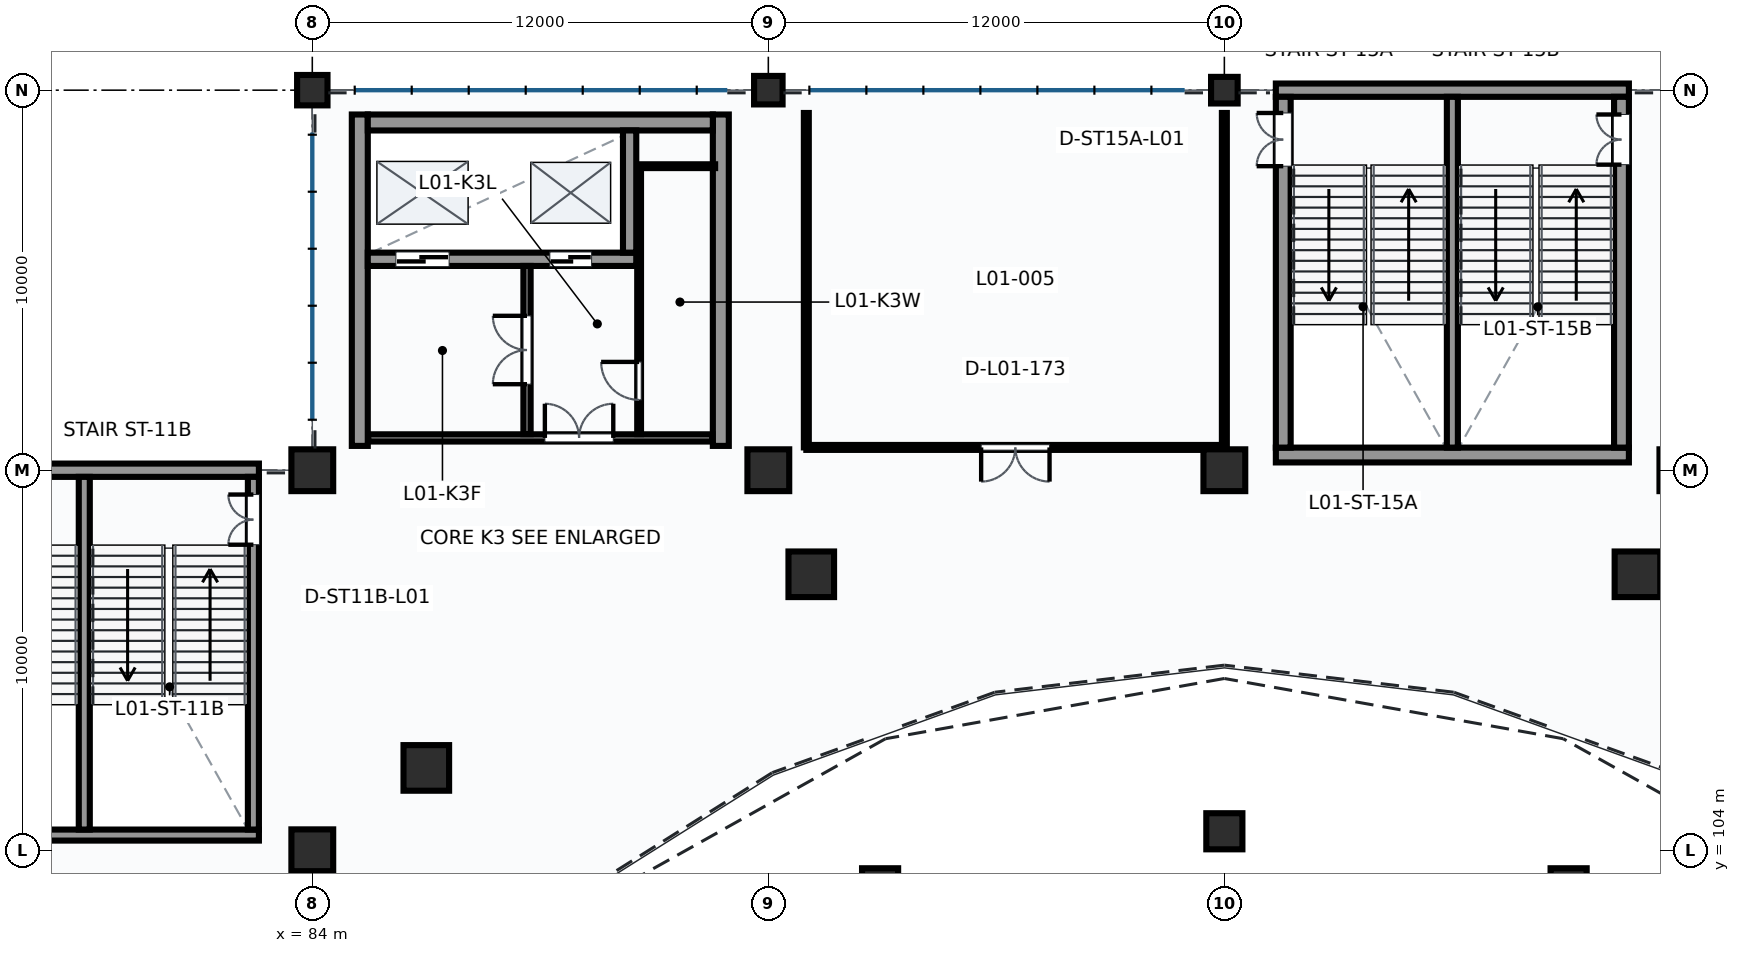
"""IFC4 building model, lengths in metres.
Left out: names, types, materials, properties, quantities, classifications, styles, units other than length and angle.
Written with IfcOpenShell. Run it as: python <this file> out.ifc"""

import sys

from ifc_helpers import new_model, si_unit, direction, frame, frame_2d, origin, origin_2d, place, context, subcontext, project, spatial, rectangle, extrude, element, fill, save


model = new_model("IFC4")
c1 = context("Model", 3, precision=1e-05, world=origin(), true_north=direction((0.0, 1.0)))
c2 = subcontext(c1, "Body", "Model", "MODEL_VIEW")
j1 = project(units=[si_unit("LENGTHUNIT", "METRE"), si_unit("PLANEANGLEUNIT", "RADIAN")], contexts=[c1])
p1 = place(None, origin())
s1 = spatial("IfcSite", under=j1, at=p1, CompositionType="ELEMENT")
p2 = place(p1, origin())
s2 = spatial("IfcBuilding", under=s1, at=p2, CompositionType="ELEMENT")
p3 = place(p2, frame((0.0, 0.0, 5.4)))
s3 = spatial("IfcBuildingStorey", under=s2, at=p3, CompositionType="ELEMENT", Elevation=5.4)
for number, where, z_axis, x_axis in (
    (1, (84.0, 104.0, 0.0), (0.0, 0.0, 1.0), (1.0, 0.0, 0.0)),
    (2, (84.0, 114.0, 0.0), (0.0, 0.0, 1.0), (1.0, 0.0, 0.0)),
):
    element("IfcColumn", number, at=place(p3, frame(where, z_axis=z_axis, x_axis=x_axis)), inside=s3, PredefinedType="COLUMN", context=c2, shape_type="SweptSolid", body=[
        extrude(rectangle(XDim=1.1, YDim=1.1, at=origin_2d()), origin(), (0.0, 0.0, 1.0), 4.8),
    ])
p4 = place(p3, frame((84.0, 124.0, 0.0), z_axis=(0.0, 0.0, 1.0), x_axis=(1.0, 0.0, 0.0)))
e3 = element("IfcColumn", 3, at=p4, inside=s3, PredefinedType="COLUMN", context=c2, shape_type="SweptSolid", body=[
    extrude(rectangle(XDim=0.8, YDim=0.8, at=origin_2d()), origin(), (0.0, 0.0, 1.0), 4.8),
])
p5 = place(p3, frame((96.0, 114.0, 0.0), z_axis=(0.0, 0.0, 1.0), x_axis=(1.0, 0.0, 0.0)))
e4 = element("IfcColumn", 4, at=p5, inside=s3, PredefinedType="COLUMN", context=c2, shape_type="SweptSolid", body=[
    extrude(rectangle(XDim=1.1, YDim=1.1, at=origin_2d()), origin(), (0.0, 0.0, 1.0), 4.8),
])
p6 = place(p3, frame((96.0, 124.0, 0.0), z_axis=(0.0, 0.0, 1.0), x_axis=(1.0, 0.0, 0.0)))
e5 = element("IfcColumn", 5, at=p6, inside=s3, PredefinedType="COLUMN", context=c2, shape_type="SweptSolid", body=[
    extrude(rectangle(XDim=0.75, YDim=0.75, at=origin_2d()), origin(), (0.0, 0.0, 1.0), 4.8),
])
p7 = place(p3, frame((108.0, 114.0, 0.0), z_axis=(0.0, 0.0, 1.0), x_axis=(1.0, 0.0, 0.0)))
e6 = element("IfcColumn", 6, at=p7, inside=s3, PredefinedType="COLUMN", context=c2, shape_type="SweptSolid", body=[
    extrude(rectangle(XDim=1.1, YDim=1.1, at=origin_2d()), origin(), (0.0, 0.0, 1.0), 4.8),
])
p8 = place(p3, frame((108.0, 124.0, 0.0), z_axis=(0.0, 0.0, 1.0), x_axis=(1.0, 0.0, 0.0)))
e7 = element("IfcColumn", 7, at=p8, inside=s3, PredefinedType="COLUMN", context=c2, shape_type="SweptSolid", body=[
    extrude(rectangle(XDim=0.7, YDim=0.7, at=origin_2d()), origin(), (0.0, 0.0, 1.0), 4.8),
])
p9 = place(p3, frame((117.059, 103.052, 0.0), z_axis=(0.0, 0.0, 1.0), x_axis=(1.0, 0.0, 0.0)))
e8 = element("IfcColumn", 8, at=p9, inside=s3, PredefinedType="COLUMN", context=c2, shape_type="SweptSolid", body=[
    extrude(rectangle(XDim=0.95, YDim=0.95, at=origin_2d()), origin(), (0.0, 0.0, 1.0), 4.8),
])
p10 = place(p3, frame((118.87, 111.262, 0.0), z_axis=(0.0, 0.0, 1.0), x_axis=(1.0, 0.0, 0.0)))
e9 = element("IfcColumn", 9, at=p10, inside=s3, PredefinedType="COLUMN", context=c2, shape_type="SweptSolid", body=[
    extrude(rectangle(XDim=1.2, YDim=1.2, at=origin_2d()), origin(), (0.0, 0.0, 1.0), 4.8),
])
for number, where, z_axis, x_axis in (
    (10, (108.0, 104.5, 0.0), (0.0, 0.0, 1.0), (1.0, 0.0, 0.0)),
    (11, (98.941, 103.052, 0.0), (0.0, 0.0, 1.0), (1.0, 0.0, 0.0)),
):
    element("IfcColumn", number, at=place(p3, frame(where, z_axis=z_axis, x_axis=x_axis)), inside=s3, PredefinedType="COLUMN", context=c2, shape_type="SweptSolid", body=[
        extrude(rectangle(XDim=0.95, YDim=0.95, at=origin_2d()), origin(), (0.0, 0.0, 1.0), 4.8),
    ])
for number, where, z_axis, x_axis in (
    (12, (97.13, 111.262, 0.0), (0.0, 0.0, 1.0), (1.0, 0.0, 0.0)),
    (13, (87.0, 106.167, 0.0), (0.0, 0.0, 1.0), (1.0, 0.0, 0.0)),
):
    element("IfcColumn", number, at=place(p3, frame(where, z_axis=z_axis, x_axis=x_axis)), inside=s3, PredefinedType="COLUMN", context=c2, shape_type="SweptSolid", body=[
        extrude(rectangle(XDim=1.2, YDim=1.2, at=origin_2d()), origin(), (0.0, 0.0, 1.0), 4.8),
    ])
p11 = place(p3, frame((73.405, 104.4, 0.0), z_axis=(0.0, 0.0, 1.0), x_axis=(1.0, 0.0, 0.0)))
e14 = element("IfcWall", 14, at=p11, inside=s3, PredefinedType="SHEAR", context=c2, shape_type="SweptSolid", body=[
    extrude(rectangle(XDim=9.19, YDim=0.29, at=frame_2d((4.595, 0.0))), origin(), (0.0, 0.0, 1.0), 4.8),
])
p12 = place(p3, frame((73.405, 114.0, 0.0), z_axis=(0.0, 0.0, 1.0), x_axis=(1.0, 0.0, 0.0)))
e15 = element("IfcWall", 15, at=p12, inside=s3, PredefinedType="SHEAR", context=c2, shape_type="SweptSolid", body=[
    extrude(rectangle(XDim=9.19, YDim=0.35, at=frame_2d((4.595, 0.0))), origin(), (0.0, 0.0, 1.0), 3.984),
])
p13 = place(p3, frame((82.45, 104.545, 0.0), z_axis=(0.0, 0.0, 1.0), x_axis=(0.0, 1.0, 0.0)))
e16 = element("IfcWall", 16, at=p13, inside=s3, PredefinedType="SHEAR", context=c2, shape_type="SweptSolid", body=[
    extrude(rectangle(XDim=9.28, YDim=0.29, at=frame_2d((4.64, 0.0))), origin(), (0.0, 0.0, 1.0), 4.8),
])
p14 = place(p13, frame((7.495, 0.0, 0.0)))
e17 = element("IfcOpeningElement", 17, at=p14, cuts=e16, PredefinedType="OPENING", context=c2, shape_type="SweptSolid", body=[
    extrude(rectangle(XDim=1.32, YDim=2.2, at=frame_2d((0.66, 1.1))), frame((0.0, 0.155, 0.0), z_axis=(0.0, -1.0, 0.0), x_axis=(1.0, 0.0, 0.0)), (0.0, 0.0, 1.0), 0.31),
])
p15 = place(p3, frame((78.0, 104.545, 0.0), z_axis=(0.0, 0.0, 1.0), x_axis=(0.0, 1.0, 0.0)))
e18 = element("IfcWall", 18, at=p15, inside=s3, PredefinedType="SHEAR", context=c2, shape_type="SweptSolid", body=[
    extrude(rectangle(XDim=9.28, YDim=0.29, at=frame_2d((4.64, 0.0))), origin(), (0.0, 0.0, 1.0), 4.8),
])
p16 = place(p3, frame((109.355, 114.4, 0.0), z_axis=(0.0, 0.0, 1.0), x_axis=(1.0, 0.0, 0.0)))
e19 = element("IfcWall", 19, at=p16, inside=s3, PredefinedType="SHEAR", context=c2, shape_type="SweptSolid", body=[
    extrude(rectangle(XDim=9.29, YDim=0.39, at=frame_2d((4.645, 0.0))), origin(), (0.0, 0.0, 1.0), 4.8),
])
p17 = place(p3, frame((109.355, 124.0, 0.0), z_axis=(0.0, 0.0, 1.0), x_axis=(1.0, 0.0, 0.0)))
e20 = element("IfcWall", 20, at=p17, inside=s3, PredefinedType="SHEAR", context=c2, shape_type="SweptSolid", body=[
    extrude(rectangle(XDim=9.29, YDim=0.35, at=frame_2d((4.645, 0.0))), origin(), (0.0, 0.0, 1.0), 3.757),
])
p18 = place(p3, frame((109.55, 114.595, 0.0), z_axis=(0.0, 0.0, 1.0), x_axis=(0.0, 1.0, 0.0)))
e21 = element("IfcWall", 21, at=p18, inside=s3, PredefinedType="SHEAR", context=c2, shape_type="SweptSolid", body=[
    extrude(rectangle(XDim=9.23, YDim=0.39, at=frame_2d((4.615, 0.0))), origin(), (0.0, 0.0, 1.0), 4.8),
])
p19 = place(p18, frame((7.405, 0.0, 0.0)))
e22 = element("IfcOpeningElement", 22, at=p19, cuts=e21, PredefinedType="OPENING", context=c2, shape_type="SweptSolid", body=[
    extrude(rectangle(XDim=1.4, YDim=2.2, at=frame_2d((0.7, 1.1))), frame((0.0, 0.205, 0.0), z_axis=(0.0, -1.0, 0.0), x_axis=(1.0, 0.0, 0.0)), (0.0, 0.0, 1.0), 0.41),
])
p20 = place(p3, frame((118.45, 114.595, 0.0), z_axis=(0.0, 0.0, 1.0), x_axis=(0.0, 1.0, 0.0)))
e23 = element("IfcWall", 23, at=p20, inside=s3, PredefinedType="SHEAR", context=c2, shape_type="SweptSolid", body=[
    extrude(rectangle(XDim=9.23, YDim=0.39, at=frame_2d((4.615, 0.0))), origin(), (0.0, 0.0, 1.0), 4.8),
])
p21 = place(p20, frame((7.445, 0.0, 0.0)))
e24 = element("IfcOpeningElement", 24, at=p21, cuts=e23, PredefinedType="OPENING", context=c2, shape_type="SweptSolid", body=[
    extrude(rectangle(XDim=1.32, YDim=2.2, at=frame_2d((0.66, 1.1))), frame((0.0, 0.205, 0.0), z_axis=(0.0, -1.0, 0.0), x_axis=(1.0, 0.0, 0.0)), (0.0, 0.0, 1.0), 0.41),
])
p22 = place(p3, frame((114.0, 114.595, 0.0), z_axis=(0.0, 0.0, 1.0), x_axis=(0.0, 1.0, 0.0)))
e25 = element("IfcWall", 25, at=p22, inside=s3, PredefinedType="SHEAR", context=c2, shape_type="SweptSolid", body=[
    extrude(rectangle(XDim=9.23, YDim=0.29, at=frame_2d((4.615, 0.0))), origin(), (0.0, 0.0, 1.0), 4.8),
])
for number, where, z_axis, x_axis in (
    (26, (85.25, 114.64, 0.0), (0.0, 0.0, 1.0), (0.0, 1.0, 0.0)),
    (27, (94.75, 114.64, 0.0), (0.0, 0.0, 1.0), (0.0, 1.0, 0.0)),
):
    element("IfcWall", number, at=place(p3, frame(where, z_axis=z_axis, x_axis=x_axis)), inside=s3, PredefinedType="SHEAR", context=c2, shape_type="SweptSolid", body=[
        extrude(rectangle(XDim=8.72, YDim=0.42, at=frame_2d((4.36, 0.0))), origin(), (0.0, 0.0, 1.0), 4.8),
    ])
p23 = place(p3, frame((85.46, 123.15, 0.0), z_axis=(0.0, 0.0, 1.0), x_axis=(1.0, 0.0, 0.0)))
e28 = element("IfcWall", 28, at=p23, inside=s3, PredefinedType="SHEAR", context=c2, shape_type="SweptSolid", body=[
    extrude(rectangle(XDim=9.08, YDim=0.42, at=frame_2d((4.54, 0.0))), origin(), (0.0, 0.0, 1.0), 4.8),
])
p24 = place(p3, frame((85.46, 119.55, 0.0), z_axis=(0.0, 0.0, 1.0), x_axis=(1.0, 0.0, 0.0)))
e29 = element("IfcWall", 29, at=p24, inside=s3, PredefinedType="SHEAR", context=c2, shape_type="SweptSolid", body=[
    extrude(rectangle(XDim=7.065, YDim=0.35, at=frame_2d((3.532, 0.0))), origin(), (0.0, 0.0, 1.0), 4.8),
])
p25 = place(p24, frame((0.74, 0.0, 0.0)))
e30 = element("IfcOpeningElement", 30, at=p25, cuts=e29, PredefinedType="OPENING", context=c2, shape_type="SweptSolid", body=[
    extrude(rectangle(XDim=1.4, YDim=2.3, at=frame_2d((0.7, 1.15))), frame((0.0, 0.185, 0.0), z_axis=(0.0, -1.0, 0.0), x_axis=(1.0, 0.0, 0.0)), (0.0, 0.0, 1.0), 0.37),
])
p26 = place(p24, frame((4.79, 0.0, 0.0)))
e31 = element("IfcOpeningElement", 31, at=p26, cuts=e29, PredefinedType="OPENING", context=c2, shape_type="SweptSolid", body=[
    extrude(rectangle(XDim=1.1, YDim=2.2, at=frame_2d((0.55, 1.1))), frame((0.0, 0.185, 0.0), z_axis=(0.0, -1.0, 0.0), x_axis=(1.0, 0.0, 0.0)), (0.0, 0.0, 1.0), 0.37),
])
p27 = place(p3, frame((92.35, 119.725, 0.0), z_axis=(0.0, 0.0, 1.0), x_axis=(0.0, 1.0, 0.0)))
e32 = element("IfcWall", 32, at=p27, inside=s3, PredefinedType="SHEAR", context=c2, shape_type="SweptSolid", body=[
    extrude(rectangle(XDim=3.215, YDim=0.35, at=frame_2d((1.607, 0.0))), origin(), (0.0, 0.0, 1.0), 4.8),
])
p28 = place(p3, frame((85.47, 114.85, 0.0), z_axis=(0.0, 0.0, 1.0), x_axis=(1.0, 0.0, 0.0)))
e33 = element("IfcWall", 33, at=p28, inside=s3, PredefinedType="PARTITIONING", context=c2, shape_type="SweptSolid", body=[
    extrude(rectangle(XDim=9.06, YDim=0.19, at=frame_2d((4.53, 0.0))), origin(), (0.0, 0.0, 1.0), 4.47),
])
p29 = place(p28, frame((4.65, 0.0, 0.0)))
e34 = element("IfcOpeningElement", 34, at=p29, cuts=e33, PredefinedType="OPENING", context=c2, shape_type="SweptSolid", body=[
    extrude(rectangle(XDim=1.8, YDim=2.3, at=frame_2d((0.9, 1.15))), frame((0.0, 0.105, 0.0), z_axis=(0.0, -1.0, 0.0), x_axis=(1.0, 0.0, 0.0)), (0.0, 0.0, 1.0), 0.21),
])
p30 = place(p3, frame((89.65, 114.95, 0.0), z_axis=(0.0, 0.0, 1.0), x_axis=(0.0, 1.0, 0.0)))
e35 = element("IfcWall", 35, at=p30, inside=s3, PredefinedType="PARTITIONING", context=c2, shape_type="SweptSolid", body=[
    extrude(rectangle(XDim=4.425, YDim=0.19, at=frame_2d((2.212, 0.0))), origin(), (0.0, 0.0, 1.0), 4.47),
])
p31 = place(p30, frame((1.313, 0.0, 0.0)))
e36 = element("IfcOpeningElement", 36, at=p31, cuts=e35, PredefinedType="OPENING", context=c2, shape_type="SweptSolid", body=[
    extrude(rectangle(XDim=1.8, YDim=2.2, at=frame_2d((0.9, 1.1))), frame((0.0, 0.105, 0.0), z_axis=(0.0, -1.0, 0.0), x_axis=(1.0, 0.0, 0.0)), (0.0, 0.0, 1.0), 0.21),
])
p32 = place(p3, frame((92.6, 114.95, 0.0), z_axis=(0.0, 0.0, 1.0), x_axis=(0.0, 1.0, 0.0)))
e37 = element("IfcWall", 37, at=p32, inside=s3, PredefinedType="PARTITIONING", context=c2, shape_type="SweptSolid", body=[
    extrude(rectangle(XDim=7.05, YDim=0.1, at=frame_2d((3.525, 0.0))), origin(), (0.0, 0.0, 1.0), 4.47),
])
p33 = place(p32, frame((0.9, 0.0, 0.0)))
e38 = element("IfcOpeningElement", 38, at=p33, cuts=e37, PredefinedType="OPENING", context=c2, shape_type="SweptSolid", body=[
    extrude(rectangle(XDim=1.0, YDim=2.1, at=frame_2d((0.5, 1.05))), frame((0.0, 0.06, 0.0), z_axis=(0.0, -1.0, 0.0), x_axis=(1.0, 0.0, 0.0)), (0.0, 0.0, 1.0), 0.12),
])
p34 = place(p3, frame((92.6, 122.0, 0.0), z_axis=(0.0, 0.0, 1.0), x_axis=(1.0, 0.0, 0.0)))
e39 = element("IfcWall", 39, at=p34, inside=s3, PredefinedType="PARTITIONING", context=c2, shape_type="SweptSolid", body=[
    extrude(rectangle(XDim=2.0, YDim=0.1, at=frame_2d((1.0, 0.0))), origin(), (0.0, 0.0, 1.0), 4.47),
])
p35 = place(p3, frame((108.0, 123.4, 0.0), z_axis=(0.0, 0.0, 1.0), x_axis=(0.0, -1.0, 0.0)))
e40 = element("IfcWall", 40, at=p35, inside=s3, PredefinedType="PARTITIONING", context=c2, shape_type="SweptSolid", body=[
    extrude(rectangle(XDim=8.8, YDim=0.13, at=frame_2d((4.4, 0.0))), origin(), (0.0, 0.0, 1.0), 3.599),
])
p36 = place(p3, frame((108.0, 114.6, 0.0), z_axis=(0.0, 0.0, 1.0), x_axis=(-1.0, 0.0, 0.0)))
e41 = element("IfcWall", 41, at=p36, inside=s3, PredefinedType="PARTITIONING", context=c2, shape_type="SweptSolid", body=[
    extrude(rectangle(XDim=11.0, YDim=0.13, at=frame_2d((5.5, 0.0))), origin(), (0.0, 0.0, 1.0), 3.599),
])
p37 = place(p36, frame((4.6, 0.0, 0.0)))
e42 = element("IfcOpeningElement", 42, at=p37, cuts=e41, PredefinedType="OPENING", context=c2, shape_type="SweptSolid", body=[
    extrude(rectangle(XDim=1.8, YDim=2.3, at=frame_2d((0.9, 1.15))), frame((0.0, 0.075, 0.0), z_axis=(0.0, -1.0, 0.0), x_axis=(1.0, 0.0, 0.0)), (0.0, 0.0, 1.0), 0.15),
])
p38 = place(p3, frame((97.0, 114.6, 0.0), z_axis=(0.0, 0.0, 1.0), x_axis=(0.0, 1.0, 0.0)))
e43 = element("IfcWall", 43, at=p38, inside=s3, PredefinedType="PARTITIONING", context=c2, shape_type="SweptSolid", body=[
    extrude(rectangle(XDim=8.8, YDim=0.13, at=frame_2d((4.4, 0.0))), origin(), (0.0, 0.0, 1.0), 4.147),
])
p39 = place(p14, origin())
e44 = element("IfcDoor", 44, at=p39, inside=s3, OperationType="DOUBLE_DOOR_SINGLE_SWING", PredefinedType="DOOR", context=c2, shape_type="SweptSolid", body=[
    extrude(rectangle(XDim=1.32, YDim=2.2, at=frame_2d((0.66, 1.1))), frame((0.0, 0.025, 0.0), z_axis=(0.0, -1.0, 0.0), x_axis=(1.0, 0.0, 0.0)), (0.0, 0.0, 1.0), 0.05),
])
fill(e17, e44)
p40 = place(p19, frame((1.4, 0.0, 0.0), z_axis=(0.0, 0.0, 1.0), x_axis=(-1.0, 0.0, 0.0)))
e45 = element("IfcDoor", 45, at=p40, inside=s3, OperationType="DOUBLE_DOOR_SINGLE_SWING", PredefinedType="DOOR", context=c2, shape_type="SweptSolid", body=[
    extrude(rectangle(XDim=1.4, YDim=2.2, at=frame_2d((0.7, 1.1))), frame((0.0, 0.025, 0.0), z_axis=(0.0, -1.0, 0.0), x_axis=(1.0, 0.0, 0.0)), (0.0, 0.0, 1.0), 0.05),
])
fill(e22, e45)
p41 = place(p21, origin())
e46 = element("IfcDoor", 46, at=p41, inside=s3, OperationType="DOUBLE_DOOR_SINGLE_SWING", PredefinedType="DOOR", context=c2, shape_type="SweptSolid", body=[
    extrude(rectangle(XDim=1.32, YDim=2.2, at=frame_2d((0.66, 1.1))), frame((0.0, 0.025, 0.0), z_axis=(0.0, -1.0, 0.0), x_axis=(1.0, 0.0, 0.0)), (0.0, 0.0, 1.0), 0.05),
])
fill(e24, e46)
p42 = place(p25, origin())
e47 = element("IfcDoor", 47, at=p42, inside=s3, OperationType="SLIDING_TO_LEFT", PredefinedType="DOOR", context=c2, shape_type="SweptSolid", body=[
    extrude(rectangle(XDim=1.4, YDim=2.3, at=frame_2d((0.7, 1.15))), frame((0.0, 0.025, 0.0), z_axis=(0.0, -1.0, 0.0), x_axis=(1.0, 0.0, 0.0)), (0.0, 0.0, 1.0), 0.05),
])
fill(e30, e47)
p43 = place(p26, origin())
e48 = element("IfcDoor", 48, at=p43, inside=s3, OperationType="SLIDING_TO_LEFT", PredefinedType="DOOR", context=c2, shape_type="SweptSolid", body=[
    extrude(rectangle(XDim=1.1, YDim=2.2, at=frame_2d((0.55, 1.1))), frame((0.0, 0.025, 0.0), z_axis=(0.0, -1.0, 0.0), x_axis=(1.0, 0.0, 0.0)), (0.0, 0.0, 1.0), 0.05),
])
fill(e31, e48)
p44 = place(p29, origin())
e49 = element("IfcDoor", 49, at=p44, inside=s3, OperationType="DOUBLE_DOOR_SINGLE_SWING", PredefinedType="DOOR", context=c2, shape_type="SweptSolid", body=[
    extrude(rectangle(XDim=1.8, YDim=2.3, at=frame_2d((0.9, 1.15))), frame((0.0, 0.025, 0.0), z_axis=(0.0, -1.0, 0.0), x_axis=(1.0, 0.0, 0.0)), (0.0, 0.0, 1.0), 0.05),
])
fill(e34, e49)
p45 = place(p31, origin())
e50 = element("IfcDoor", 50, at=p45, inside=s3, OperationType="DOUBLE_DOOR_SINGLE_SWING", PredefinedType="DOOR", context=c2, shape_type="SweptSolid", body=[
    extrude(rectangle(XDim=1.8, YDim=2.2, at=frame_2d((0.9, 1.1))), frame((0.0, 0.025, 0.0), z_axis=(0.0, -1.0, 0.0), x_axis=(1.0, 0.0, 0.0)), (0.0, 0.0, 1.0), 0.05),
])
fill(e36, e50)
p46 = place(p33, origin())
e51 = element("IfcDoor", 51, at=p46, inside=s3, OperationType="SINGLE_SWING_RIGHT", PredefinedType="DOOR", context=c2, shape_type="SweptSolid", body=[
    extrude(rectangle(XDim=1.0, YDim=2.1, at=frame_2d((0.5, 1.05))), frame((0.0, 0.025, 0.0), z_axis=(0.0, -1.0, 0.0), x_axis=(1.0, 0.0, 0.0)), (0.0, 0.0, 1.0), 0.05),
])
fill(e38, e51)
p47 = place(p37, origin())
e52 = element("IfcDoor", 52, at=p47, inside=s3, OperationType="DOUBLE_DOOR_SINGLE_SWING", PredefinedType="DOOR", context=c2, shape_type="SweptSolid", body=[
    extrude(rectangle(XDim=1.8, YDim=2.3, at=frame_2d((0.9, 1.15))), frame((0.0, 0.025, 0.0), z_axis=(0.0, -1.0, 0.0), x_axis=(1.0, 0.0, 0.0)), (0.0, 0.0, 1.0), 0.05),
])
fill(e42, e52)
save(model, sys.argv[1])
